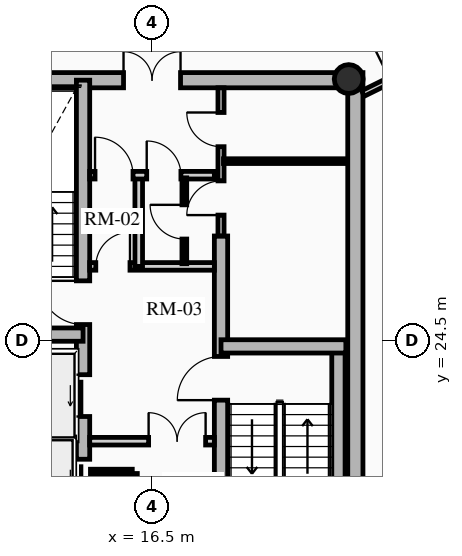
"""IFC4 building model, lengths in metres.
Left out: names, types, materials, properties, quantities, classifications, styles, units other than length and angle.
Written with IfcOpenShell. Run it as: python <this file> out.ifc"""

import sys

from ifc_helpers import new_model, si_unit, direction, frame, frame_2d, origin, origin_2d, place, context, subcontext, project, spatial, rectangle, hollow_circle, extrude, source, transform, mapped, element, fill, save


model = new_model("IFC4")
c1 = context("Model", 3, precision=1e-05, world=origin(), true_north=direction((0.0, 1.0)))
c2 = subcontext(c1, "Body", "Model", "MODEL_VIEW")
j1 = project(units=[si_unit("LENGTHUNIT", "METRE"), si_unit("PLANEANGLEUNIT", "RADIAN")], contexts=[c1])
p1 = place(None, origin())
s1 = spatial("IfcSite", under=j1, at=p1, CompositionType="ELEMENT")
p2 = place(p1, origin())
s2 = spatial("IfcBuilding", under=s1, at=p2, CompositionType="ELEMENT")
p3 = place(p2, frame((0.0, 0.0, 166.15)))
s3 = spatial("IfcBuildingStorey", under=s2, at=p3, CompositionType="ELEMENT", Elevation=166.15)
p4 = place(p3, frame((21.85, 17.45, 0.0), z_axis=(0.0, 0.0, 1.0), x_axis=(0.0, 1.0, 0.0)))
e1 = element("IfcWall", 1, at=p4, inside=s3, PredefinedType="SHEAR", context=c2, shape_type="SweptSolid", body=[
    extrude(rectangle(XDim=14.1, YDim=0.4, at=frame_2d((7.05, 0.0))), origin(), (0.0, 0.0, 1.0), 2.91),
])
p5 = place(p3, frame((11.15, 31.35, 0.0), z_axis=(0.0, 0.0, 1.0), x_axis=(1.0, 0.0, 0.0)))
e2 = element("IfcWall", 2, at=p5, inside=s3, PredefinedType="SHEAR", context=c2, shape_type="SweptSolid", body=[
    extrude(rectangle(XDim=10.7, YDim=0.4, at=frame_2d((5.35, 0.0))), origin(), (0.0, 0.0, 1.0), 2.91),
])
m1 = source(origin(), c2, "Body", "SweptSolid", [
    extrude(rectangle(XDim=1.5, YDim=2.02, at=frame_2d((0.75, 1.01))), frame((0.0, 0.21, 0.0), z_axis=(0.0, -1.0, 0.0), x_axis=(1.0, 0.0, 0.0)), (0.0, 0.0, 1.0), 0.42),
])
p6 = place(p5, frame((4.6, 0.0, 0.0)))
e3 = element("IfcOpeningElement", 3, at=p6, cuts=e2, PredefinedType="OPENING", context=c2, shape_type="MappedRepresentation", body=[
    mapped(m1, transform((0.0, 0.0, 0.0), x_axis=(1.0, 0.0, 0.0), y_axis=(0.0, 1.0, 0.0), z_axis=(0.0, 0.0, 1.0), scale=1.0)),
])
p7 = place(p3, frame((14.685, 17.65, 0.0), z_axis=(0.0, 0.0, 1.0), x_axis=(0.0, 1.0, 0.0)))
e4 = element("IfcWall", 4, at=p7, inside=s3, PredefinedType="SHEAR", context=c2, shape_type="SweptSolid", body=[
    extrude(rectangle(XDim=13.7, YDim=0.35, at=frame_2d((6.85, 0.0))), origin(), (0.0, 0.0, 1.0), 2.91),
])
m2 = source(origin(), c2, "Body", "SweptSolid", [
    extrude(rectangle(XDim=1.1, YDim=2.015, at=frame_2d((0.55, 1.007))), frame((0.0, 0.185, 0.0), z_axis=(0.0, -1.0, 0.0), x_axis=(1.0, 0.0, 0.0)), (0.0, 0.0, 1.0), 0.37),
])
p8 = place(p7, frame((4.85, 0.0, 0.0)))
e5 = element("IfcOpeningElement", 5, at=p8, cuts=e4, PredefinedType="OPENING", context=c2, shape_type="MappedRepresentation", body=[
    mapped(m2, transform((0.0, 0.0, 0.0), x_axis=(1.0, 0.0, 0.0), y_axis=(0.0, 1.0, 0.0), z_axis=(0.0, 0.0, 1.0), scale=1.0)),
])
p9 = place(p7, frame((0.625, 0.0, 0.0)))
e6 = element("IfcOpeningElement", 6, at=p9, cuts=e4, PredefinedType="OPENING", context=c2, shape_type="MappedRepresentation", body=[
    mapped(m2, transform((0.0, 0.0, 0.0), x_axis=(1.0, 0.0, 0.0), y_axis=(0.0, 1.0, 0.0), z_axis=(0.0, 0.0, 1.0), scale=1.0)),
])
p10 = place(p7, frame((2.625, 0.0, 0.0)))
e7 = element("IfcOpeningElement", 7, at=p10, cuts=e4, PredefinedType="OPENING", context=c2, shape_type="MappedRepresentation", body=[
    mapped(m2, transform((0.0, 0.0, 0.0), x_axis=(1.0, 0.0, 0.0), y_axis=(0.0, 1.0, 0.0), z_axis=(0.0, 0.0, 1.0), scale=1.0)),
])
m3 = source(origin(), c2, "Body", "SweptSolid", [
    extrude(rectangle(XDim=1.15, YDim=2.02, at=frame_2d((0.575, 1.01))), frame((0.0, 0.185, 0.0), z_axis=(0.0, -1.0, 0.0), x_axis=(1.0, 0.0, 0.0)), (0.0, 0.0, 1.0), 0.37),
])
p11 = place(p7, frame((7.27, 0.0, 0.0)))
e8 = element("IfcOpeningElement", 8, at=p11, cuts=e4, PredefinedType="OPENING", context=c2, shape_type="MappedRepresentation", body=[
    mapped(m3, transform((0.0, 0.0, 0.0), x_axis=(1.0, 0.0, 0.0), y_axis=(0.0, 1.0, 0.0), z_axis=(0.0, 0.0, 1.0), scale=1.0)),
])
p12 = place(p3, frame((18.315, 17.65, 0.0), z_axis=(0.0, 0.0, 1.0), x_axis=(0.0, 1.0, 0.0)))
e9 = element("IfcWall", 9, at=p12, inside=s3, PredefinedType="SHEAR", context=c2, shape_type="SweptSolid", body=[
    extrude(rectangle(XDim=9.6, YDim=0.35, at=frame_2d((4.8, 0.0))), origin(), (0.0, 0.0, 1.0), 2.91),
])
p13 = place(p12, frame((5.28, 0.0, 0.0)))
e10 = element("IfcOpeningElement", 10, at=p13, cuts=e9, PredefinedType="OPENING", context=c2, shape_type="MappedRepresentation", body=[
    mapped(m3, transform((0.0, 0.0, 0.0), x_axis=(1.0, 0.0, 0.0), y_axis=(0.0, 1.0, 0.0), z_axis=(0.0, 0.0, 1.0), scale=1.0)),
])
p14 = place(p3, frame((11.4, 24.655, 0.0), z_axis=(0.0, 0.0, 1.0), x_axis=(1.0, 0.0, 0.0)))
e11 = element("IfcWall", 11, at=p14, inside=s3, PredefinedType="SHEAR", context=c2, shape_type="SweptSolid", body=[
    extrude(rectangle(XDim=3.285, YDim=0.35, at=frame_2d((1.643, 0.0))), origin(), (0.0, 0.0, 1.0), 2.91),
])
p15 = place(p3, frame((21.405, 17.65, 0.0), z_axis=(0.0, 0.0, 1.0), x_axis=(0.0, 1.0, 0.0)))
e12 = element("IfcWall", 12, at=p15, inside=s3, PredefinedType="SHEAR", context=c2, shape_type="SweptSolid", body=[
    extrude(rectangle(XDim=6.695, YDim=0.35, at=frame_2d((3.348, 0.0))), origin(), (0.0, 0.0, 1.0), 2.91),
])
p16 = place(p3, frame((18.315, 24.345, 0.0), z_axis=(0.0, 0.0, 1.0), x_axis=(1.0, 0.0, 0.0)))
e13 = element("IfcWall", 13, at=p16, inside=s3, PredefinedType="SHEAR", context=c2, shape_type="SweptSolid", body=[
    extrude(rectangle(XDim=3.285, YDim=0.35, at=frame_2d((1.643, 0.0))), origin(), (0.0, 0.0, 1.0), 2.91),
])
p17 = place(p3, frame((21.675, 31.38, 0.0), z_axis=(0.0, 0.0, 1.0), x_axis=(1.0, 0.0, 0.0)))
e14 = element("IfcColumn", 14, at=p17, inside=s3, PredefinedType="COLUMN", context=c2, shape_type="SweptSolid", body=[
    extrude(hollow_circle(Radius=0.38, WallThickness=0.032, at=origin_2d()), origin(), (0.0, 0.0, 1.0), 2.91),
])
p18 = place(p3, frame((11.52, 21.8, 0.0), z_axis=(0.0, 0.0, 1.0), x_axis=(1.0, 0.0, 0.0)))
e15 = element("IfcWall", 15, at=p18, inside=s3, PredefinedType="SHEAR", context=c2, shape_type="SweptSolid", body=[
    extrude(rectangle(XDim=2.97, YDim=0.2, at=frame_2d((1.485, 0.0))), origin(), (0.0, 0.0, 1.0), 2.91),
])
p19 = place(p3, frame((14.86, 21.85, 0.0), z_axis=(0.0, 0.0, 1.0), x_axis=(1.0, 0.0, 0.0)))
e16 = element("IfcWall", 16, at=p19, inside=s3, PredefinedType="PARTITIONING", context=c2, shape_type="SweptSolid", body=[
    extrude(rectangle(XDim=3.28, YDim=0.2, at=frame_2d((1.64, 0.0))), origin(), (0.0, 0.0, 1.0), 2.675),
])
m4 = source(origin(), c2, "Body", "SweptSolid", [
    extrude(rectangle(XDim=1.5, YDim=2.02, at=frame_2d((0.75, 1.01))), frame((0.0, 0.11, 0.0), z_axis=(0.0, -1.0, 0.0), x_axis=(1.0, 0.0, 0.0)), (0.0, 0.0, 1.0), 0.22),
])
p20 = place(p19, frame((1.55, 0.0, 0.0)))
e17 = element("IfcOpeningElement", 17, at=p20, cuts=e16, PredefinedType="OPENING", context=c2, shape_type="MappedRepresentation", body=[
    mapped(m4, transform((0.0, 0.0, 0.0), x_axis=(1.0, 0.0, 0.0), y_axis=(0.0, 1.0, 0.0), z_axis=(0.0, 0.0, 1.0), scale=1.0)),
])
p21 = place(p3, frame((14.86, 26.45, 0.0), z_axis=(0.0, 0.0, 1.0), x_axis=(1.0, 0.0, 0.0)))
e18 = element("IfcWall", 18, at=p21, inside=s3, PredefinedType="PARTITIONING", context=c2, shape_type="SweptSolid", body=[
    extrude(rectangle(XDim=3.28, YDim=0.2, at=frame_2d((1.64, 0.0))), origin(), (0.0, 0.0, 1.0), 2.675),
])
m5 = source(origin(), c2, "Body", "SweptSolid", [
    extrude(rectangle(XDim=0.9, YDim=2.005, at=frame_2d((0.45, 1.002))), frame((0.0, 0.11, 0.0), z_axis=(0.0, -1.0, 0.0), x_axis=(1.0, 0.0, 0.0)), (0.0, 0.0, 1.0), 0.22),
])
p22 = place(p21, frame((0.16, 0.0, 0.0)))
e19 = element("IfcOpeningElement", 19, at=p22, cuts=e18, PredefinedType="OPENING", context=c2, shape_type="MappedRepresentation", body=[
    mapped(m5, transform((0.0, 0.0, 0.0), x_axis=(1.0, 0.0, 0.0), y_axis=(0.0, 1.0, 0.0), z_axis=(0.0, 0.0, 1.0), scale=1.0)),
])
p23 = place(p3, frame((16.15, 26.45, 0.0), z_axis=(0.0, 0.0, 1.0), x_axis=(0.0, 1.0, 0.0)))
e20 = element("IfcWall", 20, at=p23, inside=s3, PredefinedType="PARTITIONING", context=c2, shape_type="SweptSolid", body=[
    extrude(rectangle(XDim=2.4, YDim=0.2, at=frame_2d((1.2, 0.0))), origin(), (0.0, 0.0, 1.0), 2.675),
])
p24 = place(p3, frame((14.86, 28.85, 0.0), z_axis=(0.0, 0.0, 1.0), x_axis=(1.0, 0.0, 0.0)))
e21 = element("IfcWall", 21, at=p24, inside=s3, PredefinedType="PARTITIONING", context=c2, shape_type="SweptSolid", body=[
    extrude(rectangle(XDim=3.28, YDim=0.2, at=frame_2d((1.64, 0.0))), origin(), (0.0, 0.0, 1.0), 2.675),
])
m6 = source(origin(), c2, "Body", "SweptSolid", [
    extrude(rectangle(XDim=1.0, YDim=2.015, at=frame_2d((0.5, 1.007))), frame((0.0, 0.11, 0.0), z_axis=(0.0, -1.0, 0.0), x_axis=(1.0, 0.0, 0.0)), (0.0, 0.0, 1.0), 0.22),
])
p25 = place(p24, frame((0.14, 0.0, 0.0)))
e22 = element("IfcOpeningElement", 22, at=p25, cuts=e21, PredefinedType="OPENING", context=c2, shape_type="MappedRepresentation", body=[
    mapped(m6, transform((0.0, 0.0, 0.0), x_axis=(1.0, 0.0, 0.0), y_axis=(0.0, 1.0, 0.0), z_axis=(0.0, 0.0, 1.0), scale=1.0)),
])
p26 = place(p24, frame((1.5, 0.0, 0.0)))
e23 = element("IfcOpeningElement", 23, at=p26, cuts=e21, PredefinedType="OPENING", context=c2, shape_type="MappedRepresentation", body=[
    mapped(m5, transform((0.0, 0.0, 0.0), x_axis=(1.0, 0.0, 0.0), y_axis=(0.0, 1.0, 0.0), z_axis=(0.0, 0.0, 1.0), scale=1.0)),
])
p27 = place(p3, frame((16.05, 17.92, 0.0), z_axis=(0.0, 0.0, 1.0), x_axis=(0.0, 1.0, 0.0)))
e24 = element("IfcWall", 24, at=p27, inside=s3, PredefinedType="PARTITIONING", context=c2, shape_type="SweptSolid", body=[
    extrude(rectangle(XDim=3.08, YDim=0.125, at=frame_2d((1.54, 0.0))), origin(), (0.0, 0.0, 1.0), 2.675),
])
m7 = source(origin(), c2, "Body", "SweptSolid", [
    extrude(rectangle(XDim=0.9, YDim=2.005, at=frame_2d((0.45, 1.002))), frame((0.0, 0.073, 0.0), z_axis=(0.0, -1.0, 0.0), x_axis=(1.0, 0.0, 0.0)), (0.0, 0.0, 1.0), 0.145),
])
p28 = place(p27, frame((1.05, 0.0, 0.0)))
e25 = element("IfcOpeningElement", 25, at=p28, cuts=e24, PredefinedType="OPENING", context=c2, shape_type="MappedRepresentation", body=[
    mapped(m7, transform((0.0, 0.0, 0.0), x_axis=(1.0, 0.0, 0.0), y_axis=(0.0, 1.0, 0.0), z_axis=(0.0, 0.0, 1.0), scale=1.0)),
])
p29 = place(p3, frame((14.88, 21.05, 0.0), z_axis=(0.0, 0.0, 1.0), x_axis=(1.0, 0.0, 0.0)))
e26 = element("IfcWall", 26, at=p29, inside=s3, PredefinedType="PARTITIONING", context=c2, shape_type="SweptSolid", body=[
    extrude(rectangle(XDim=1.1, YDim=0.125, at=frame_2d((0.55, 0.0))), origin(), (0.0, 0.0, 1.0), 2.675),
])
p30 = place(p3, frame((17.35, 26.52, 0.0), z_axis=(0.0, 0.0, 1.0), x_axis=(0.0, 1.0, 0.0)))
e27 = element("IfcWall", 27, at=p30, inside=s3, PredefinedType="PARTITIONING", context=c2, shape_type="SweptSolid", body=[
    extrude(rectangle(XDim=2.26, YDim=0.125, at=frame_2d((1.13, 0.0))), origin(), (0.0, 0.0, 1.0), 2.675),
])
p31 = place(p30, frame((0.65, 0.0, 0.0)))
e28 = element("IfcOpeningElement", 28, at=p31, cuts=e27, PredefinedType="OPENING", context=c2, shape_type="MappedRepresentation", body=[
    mapped(m7, transform((0.0, 0.0, 0.0), x_axis=(1.0, 0.0, 0.0), y_axis=(0.0, 1.0, 0.0), z_axis=(0.0, 0.0, 1.0), scale=1.0)),
])
p32 = place(p3, frame((18.315, 27.25, 0.0), z_axis=(0.0, 0.0, 1.0), x_axis=(0.0, 1.0, 0.0)))
e29 = element("IfcWall", 29, at=p32, inside=s3, PredefinedType="PARTITIONING", context=c2, shape_type="SweptSolid", body=[
    extrude(rectangle(XDim=3.9, YDim=0.16, at=frame_2d((1.95, 0.0))), origin(), (0.0, 0.0, 1.0), 2.675),
])
m8 = source(origin(), c2, "Body", "SweptSolid", [
    extrude(rectangle(XDim=0.9, YDim=2.005, at=frame_2d((0.45, 1.002))), frame((0.0, 0.09, 0.0), z_axis=(0.0, -1.0, 0.0), x_axis=(1.0, 0.0, 0.0)), (0.0, 0.0, 1.0), 0.18),
])
p33 = place(p32, frame((0.55, 0.0, 0.0)))
e30 = element("IfcOpeningElement", 30, at=p33, cuts=e29, PredefinedType="OPENING", context=c2, shape_type="MappedRepresentation", body=[
    mapped(m8, transform((0.0, 0.0, 0.0), x_axis=(1.0, 0.0, 0.0), y_axis=(0.0, 1.0, 0.0), z_axis=(0.0, 0.0, 1.0), scale=1.0)),
])
p34 = place(p32, frame((2.35, 0.0, 0.0)))
e31 = element("IfcOpeningElement", 31, at=p34, cuts=e29, PredefinedType="OPENING", context=c2, shape_type="MappedRepresentation", body=[
    mapped(m8, transform((0.0, 0.0, 0.0), x_axis=(1.0, 0.0, 0.0), y_axis=(0.0, 1.0, 0.0), z_axis=(0.0, 0.0, 1.0), scale=1.0)),
])
p35 = place(p3, frame((18.38, 29.22, 0.0), z_axis=(0.0, 0.0, 1.0), x_axis=(1.0, 0.0, 0.0)))
e32 = element("IfcWall", 32, at=p35, inside=s3, PredefinedType="PARTITIONING", context=c2, shape_type="SweptSolid", body=[
    extrude(rectangle(XDim=3.22, YDim=0.125, at=frame_2d((1.61, 0.0))), origin(), (0.0, 0.0, 1.0), 2.212),
])
p36 = place(p3, frame((22.05, 31.0, 0.0), z_axis=(0.0, 0.0, 1.0), x_axis=(0.896798317999, 0.442439574218, 0.0)))
e33 = element("IfcWall", 33, at=p36, inside=s3, PredefinedType="PARTITIONING", context=c2, shape_type="SweptSolid", body=[
    extrude(rectangle(XDim=2.048, YDim=0.16, at=frame_2d((1.024, 0.0))), origin(), (0.0, 0.0, 1.0), 2.245),
])
m9 = source(origin(), c2, "Body", "SweptSolid", [
    extrude(rectangle(XDim=1.05, YDim=2.015, at=frame_2d((0.525, 1.007))), frame((0.0, 0.09, 0.0), z_axis=(0.0, -1.0, 0.0), x_axis=(1.0, 0.0, 0.0)), (0.0, 0.0, 1.0), 0.18),
])
p37 = place(p36, frame((0.798, 0.0, 0.0)))
e34 = element("IfcOpeningElement", 34, at=p37, cuts=e33, PredefinedType="OPENING", context=c2, shape_type="MappedRepresentation", body=[
    mapped(m9, transform((0.0, 0.0, 0.0), x_axis=(1.0, 0.0, 0.0), y_axis=(0.0, 1.0, 0.0), z_axis=(0.0, 0.0, 1.0), scale=1.0)),
])
m10 = source(origin(), c2, "Body", "SweptSolid", [
    extrude(rectangle(XDim=1.1, YDim=2.015, at=frame_2d((0.55, 1.007))), frame((0.0, 0.025, 0.0), z_axis=(0.0, -1.0, 0.0), x_axis=(1.0, 0.0, 0.0)), (0.0, 0.0, 1.0), 0.05),
])
p38 = place(p8, origin())
e35 = element("IfcDoor", 35, at=p38, inside=s3, OperationType="SLIDING_TO_LEFT", PredefinedType="DOOR", context=c2, shape_type="MappedRepresentation", body=[
    mapped(m10, transform((0.0, 0.0, 0.0), x_axis=(1.0, 0.0, 0.0), y_axis=(0.0, 1.0, 0.0), z_axis=(0.0, 0.0, 1.0), scale=1.0)),
])
fill(e5, e35)
p39 = place(p10, origin())
e36 = element("IfcDoor", 36, at=p39, inside=s3, OperationType="SLIDING_TO_LEFT", PredefinedType="DOOR", context=c2, shape_type="MappedRepresentation", body=[
    mapped(m10, transform((0.0, 0.0, 0.0), x_axis=(1.0, 0.0, 0.0), y_axis=(0.0, 1.0, 0.0), z_axis=(0.0, 0.0, 1.0), scale=1.0)),
])
fill(e7, e36)
m11 = source(origin(), c2, "Body", "SweptSolid", [
    extrude(rectangle(XDim=1.15, YDim=2.02, at=frame_2d((0.575, 1.01))), frame((0.0, 0.025, 0.0), z_axis=(0.0, -1.0, 0.0), x_axis=(1.0, 0.0, 0.0)), (0.0, 0.0, 1.0), 0.05),
])
p40 = place(p11, origin())
e37 = element("IfcDoor", 37, at=p40, inside=s3, OperationType="SINGLE_SWING_RIGHT", PredefinedType="DOOR", context=c2, shape_type="MappedRepresentation", body=[
    mapped(m11, transform((0.0, 0.0, 0.0), x_axis=(1.0, 0.0, 0.0), y_axis=(0.0, 1.0, 0.0), z_axis=(0.0, 0.0, 1.0), scale=1.0)),
])
fill(e8, e37)
p41 = place(p13, origin())
e38 = element("IfcDoor", 38, at=p41, inside=s3, OperationType="SINGLE_SWING_LEFT", PredefinedType="DOOR", context=c2, shape_type="MappedRepresentation", body=[
    mapped(m11, transform((0.0, 0.0, 0.0), x_axis=(1.0, 0.0, 0.0), y_axis=(0.0, 1.0, 0.0), z_axis=(0.0, 0.0, 1.0), scale=1.0)),
])
fill(e10, e38)
m12 = source(origin(), c2, "Body", "SweptSolid", [
    extrude(rectangle(XDim=1.5, YDim=2.02, at=frame_2d((0.75, 1.01))), frame((0.0, 0.025, 0.0), z_axis=(0.0, -1.0, 0.0), x_axis=(1.0, 0.0, 0.0)), (0.0, 0.0, 1.0), 0.05),
])
p42 = place(p6, origin())
e39 = element("IfcDoor", 39, at=p42, inside=s3, OperationType="DOUBLE_DOOR_SINGLE_SWING", PredefinedType="DOOR", context=c2, shape_type="MappedRepresentation", body=[
    mapped(m12, transform((0.0, 0.0, 0.0), x_axis=(1.0, 0.0, 0.0), y_axis=(0.0, 1.0, 0.0), z_axis=(0.0, 0.0, 1.0), scale=1.0)),
])
fill(e3, e39)
p43 = place(p20, origin())
e40 = element("IfcDoor", 40, at=p43, inside=s3, OperationType="DOUBLE_DOOR_SINGLE_SWING", PredefinedType="DOOR", context=c2, shape_type="MappedRepresentation", body=[
    mapped(m12, transform((0.0, 0.0, 0.0), x_axis=(1.0, 0.0, 0.0), y_axis=(0.0, 1.0, 0.0), z_axis=(0.0, 0.0, 1.0), scale=1.0)),
])
fill(e17, e40)
m13 = source(origin(), c2, "Body", "SweptSolid", [
    extrude(rectangle(XDim=0.9, YDim=2.005, at=frame_2d((0.45, 1.002))), frame((0.0, 0.025, 0.0), z_axis=(0.0, -1.0, 0.0), x_axis=(1.0, 0.0, 0.0)), (0.0, 0.0, 1.0), 0.05),
])
p44 = place(p22, origin())
e41 = element("IfcDoor", 41, at=p44, inside=s3, OperationType="SINGLE_SWING_RIGHT", PredefinedType="DOOR", context=c2, shape_type="MappedRepresentation", body=[
    mapped(m13, transform((0.0, 0.0, 0.0), x_axis=(1.0, 0.0, 0.0), y_axis=(0.0, 1.0, 0.0), z_axis=(0.0, 0.0, 1.0), scale=1.0)),
])
fill(e19, e41)
m14 = source(origin(), c2, "Body", "SweptSolid", [
    extrude(rectangle(XDim=1.0, YDim=2.015, at=frame_2d((0.5, 1.007))), frame((0.0, 0.025, 0.0), z_axis=(0.0, -1.0, 0.0), x_axis=(1.0, 0.0, 0.0)), (0.0, 0.0, 1.0), 0.05),
])
p45 = place(p25, origin())
e42 = element("IfcDoor", 42, at=p45, inside=s3, OperationType="SINGLE_SWING_LEFT", PredefinedType="DOOR", context=c2, shape_type="MappedRepresentation", body=[
    mapped(m14, transform((0.0, 0.0, 0.0), x_axis=(1.0, 0.0, 0.0), y_axis=(0.0, 1.0, 0.0), z_axis=(0.0, 0.0, 1.0), scale=1.0)),
])
fill(e22, e42)
p46 = place(p26, origin())
e43 = element("IfcDoor", 43, at=p46, inside=s3, OperationType="SINGLE_SWING_LEFT", PredefinedType="DOOR", context=c2, shape_type="MappedRepresentation", body=[
    mapped(m13, transform((0.0, 0.0, 0.0), x_axis=(1.0, 0.0, 0.0), y_axis=(0.0, 1.0, 0.0), z_axis=(0.0, 0.0, 1.0), scale=1.0)),
])
fill(e23, e43)
p47 = place(p31, origin())
e44 = element("IfcDoor", 44, at=p47, inside=s3, OperationType="SINGLE_SWING_RIGHT", PredefinedType="DOOR", context=c2, shape_type="MappedRepresentation", body=[
    mapped(m13, transform((0.0, 0.0, 0.0), x_axis=(1.0, 0.0, 0.0), y_axis=(0.0, 1.0, 0.0), z_axis=(0.0, 0.0, 1.0), scale=1.0)),
])
fill(e28, e44)
p48 = place(p33, origin())
e45 = element("IfcDoor", 45, at=p48, inside=s3, OperationType="SINGLE_SWING_LEFT", PredefinedType="DOOR", context=c2, shape_type="MappedRepresentation", body=[
    mapped(m13, transform((0.0, 0.0, 0.0), x_axis=(1.0, 0.0, 0.0), y_axis=(0.0, 1.0, 0.0), z_axis=(0.0, 0.0, 1.0), scale=1.0)),
])
fill(e30, e45)
p49 = place(p34, origin())
e46 = element("IfcDoor", 46, at=p49, inside=s3, OperationType="SINGLE_SWING_RIGHT", PredefinedType="DOOR", context=c2, shape_type="MappedRepresentation", body=[
    mapped(m13, transform((0.0, 0.0, 0.0), x_axis=(1.0, 0.0, 0.0), y_axis=(0.0, 1.0, 0.0), z_axis=(0.0, 0.0, 1.0), scale=1.0)),
])
fill(e31, e46)
save(model, sys.argv[1])
